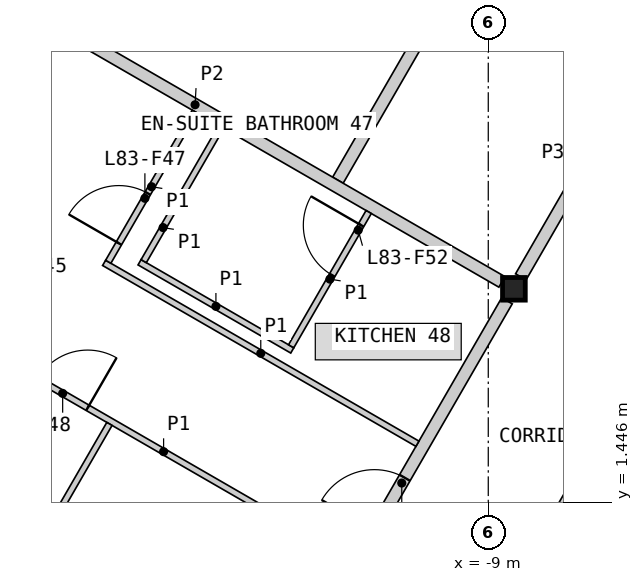
"""IFC4 building model, lengths in metres.
Left out: names, types, materials, properties, quantities, classifications, styles, units other than length and angle.
Written with IfcOpenShell. Run it as: python <this file> out.ifc"""

import sys

from ifc_helpers import new_model, si_unit, direction, frame, frame_2d, origin, origin_2d, place, context, subcontext, project, spatial, rectangle, i_section, extrude, element, fill, save


model = new_model("IFC4")
c1 = context("Model", 3, precision=1e-05, world=origin(), true_north=direction((0.0, 1.0)))
c2 = subcontext(c1, "Body", "Model", "MODEL_VIEW")
j1 = project(units=[si_unit("LENGTHUNIT", "METRE"), si_unit("PLANEANGLEUNIT", "RADIAN")], contexts=[c1])
p1 = place(None, origin())
s1 = spatial("IfcSite", under=j1, at=p1, CompositionType="ELEMENT")
p2 = place(p1, origin())
s2 = spatial("IfcBuilding", under=s1, at=p2, CompositionType="ELEMENT")
p3 = place(p2, frame((0.0, 0.0, 371.2)))
s3 = spatial("IfcBuildingStorey", under=s2, at=p3, CompositionType="ELEMENT", Elevation=371.2)
p4 = place(p3, frame((-8.578, 4.953, 0.0), z_axis=(0.0, 0.0, 1.0), x_axis=(1.0, 0.0, 0.0)))
e1 = element("IfcColumn", 1, at=p4, inside=s3, PredefinedType="COLUMN", context=c2, shape_type="SweptSolid", body=[
    extrude(i_section(OverallWidth=0.374, OverallDepth=0.372, WebThickness=0.016, FlangeThickness=0.026, at=origin_2d()), origin(), (0.0, 0.0, 1.0), 3.4),
])
p5 = place(p3, frame((-7.34, 1.698, 0.0), z_axis=(0.0, 0.0, 1.0), x_axis=(-0.50002983664, -0.866008176907, 0.0)))
e2 = element("IfcWall", 2, at=p5, inside=s3, PredefinedType="SHEAR", context=c2, shape_type="SweptSolid", body=[
    extrude(rectangle(XDim=2.2, YDim=0.6, at=frame_2d((1.1, 0.0))), origin(), (0.0, 0.0, 1.0), 3.1),
])
p6 = place(p5, frame((0.55, 0.0, 0.0)))
e3 = element("IfcOpeningElement", 3, at=p6, cuts=e2, PredefinedType="OPENING", context=c2, shape_type="SweptSolid", body=[
    extrude(rectangle(XDim=1.1, YDim=2.1, at=frame_2d((0.55, 1.05))), frame((0.0, 0.31, 0.0), z_axis=(0.0, -1.0, 0.0), x_axis=(1.0, 0.0, 0.0)), (0.0, 0.0, 1.0), 0.62),
])
p7 = place(p3, frame((-8.465, 5.15, 0.0), z_axis=(0.0, 0.0, 1.0), x_axis=(0.499992155518, 0.866029932751, 0.0)))
e4 = element("IfcWall", 4, at=p7, inside=s3, PredefinedType="PARTITIONING", context=c2, shape_type="SweptSolid", body=[
    extrude(rectangle(XDim=8.123, YDim=0.2, at=frame_2d((4.062, 0.0))), origin(), (0.0, 0.0, 1.0), 3.1),
])
p8 = place(p7, frame((3.587, 0.0, 0.0)))
e5 = element("IfcOpeningElement", 5, at=p8, cuts=e4, PredefinedType="OPENING", context=c2, shape_type="SweptSolid", body=[
    extrude(rectangle(XDim=0.95, YDim=2.1, at=frame_2d((0.475, 1.05))), frame((0.0, 0.11, 0.0), z_axis=(0.0, -1.0, 0.0), x_axis=(1.0, 0.0, 0.0)), (0.0, 0.0, 1.0), 0.22),
])
p9 = place(p3, frame((-12.754, -2.279, 0.0), z_axis=(0.0, 0.0, 1.0), x_axis=(0.500001682468, 0.866024432409, 0.0)))
e6 = element("IfcWall", 6, at=p9, inside=s3, PredefinedType="PARTITIONING", context=c2, shape_type="SweptSolid", body=[
    extrude(rectangle(XDim=8.124, YDim=0.2, at=frame_2d((4.062, 0.0))), origin(), (0.0, 0.0, 1.0), 3.1),
])
p10 = place(p9, frame((3.762, 0.0, 0.0)))
e7 = element("IfcOpeningElement", 7, at=p10, cuts=e6, PredefinedType="OPENING", context=c2, shape_type="SweptSolid", body=[
    extrude(rectangle(XDim=1.0, YDim=2.1, at=frame_2d((0.5, 1.05))), frame((0.0, 0.11, 0.0), z_axis=(0.0, -1.0, 0.0), x_axis=(1.0, 0.0, 0.0)), (0.0, 0.0, 1.0), 0.22),
])
p11 = place(p3, frame((-11.473, 6.74, 0.0), z_axis=(0.0, 0.0, 1.0), x_axis=(0.500001082559, 0.866024778768, 0.0)))
e8 = element("IfcWall", 8, at=p11, inside=s3, PredefinedType="PARTITIONING", context=c2, shape_type="SweptSolid", body=[
    extrude(rectangle(XDim=15.094, YDim=0.2, at=frame_2d((7.547, 0.0))), origin(), (0.0, 0.0, 1.0), 2.33),
])
p12 = place(p11, frame((10.383, 0.0, 0.0)))
e9 = element("IfcOpeningElement", 9, at=p12, cuts=e8, PredefinedType="OPENING", context=c2, shape_type="SweptSolid", body=[
    extrude(rectangle(XDim=0.95, YDim=2.1, at=frame_2d((0.475, 1.05))), frame((0.0, 0.11, 0.0), z_axis=(0.0, -1.0, 0.0), x_axis=(1.0, 0.0, 0.0)), (0.0, 0.0, 1.0), 0.22),
])
p13 = place(p3, frame((-18.869, 10.894, 0.0), z_axis=(0.0, 0.0, 1.0), x_axis=(0.866023724155, -0.500002909193, 0.0)))
e10 = element("IfcWall", 10, at=p13, inside=s3, PredefinedType="PARTITIONING", context=c2, shape_type="SweptSolid", body=[
    extrude(rectangle(XDim=11.655, YDim=0.2, at=frame_2d((5.827, 0.0))), origin(), (0.0, 0.0, 1.0), 2.33),
])
p14 = place(p3, frame((-24.069, 1.887, 0.0), z_axis=(0.0, 0.0, 1.0), x_axis=(0.866023404247, -0.500003463284, 0.0)))
e11 = element("IfcWall", 11, at=p14, inside=s3, PredefinedType="PARTITIONING", context=c2, shape_type="SweptSolid", body=[
    extrude(rectangle(XDim=11.782, YDim=0.1, at=frame_2d((5.891, 0.0))), origin(), (0.0, 0.0, 1.0), 2.33),
])
p15 = place(p14, frame((4.363, 0.0, 0.0)))
e12 = element("IfcOpeningElement", 12, at=p15, cuts=e11, PredefinedType="OPENING", context=c2, shape_type="SweptSolid", body=[
    extrude(rectangle(XDim=0.95, YDim=2.1, at=frame_2d((0.475, 1.05))), frame((0.0, 0.06, 0.0), z_axis=(0.0, -1.0, 0.0), x_axis=(1.0, 0.0, 0.0)), (0.0, 0.0, 1.0), 0.12),
])
p16 = place(p3, frame((-17.414, 4.049, 0.0), z_axis=(0.0, 0.0, 1.0), x_axis=(0.866033839264, -0.499985389037, 0.0)))
e13 = element("IfcWall", 13, at=p16, inside=s3, PredefinedType="PARTITIONING", context=c2, shape_type="SweptSolid", body=[
    extrude(rectangle(XDim=7.1, YDim=0.1, at=frame_2d((3.55, 0.0))), origin(), (0.0, 0.0, 1.0), 2.33),
])
p17 = place(p16, frame((1.158, 0.0, 0.0)))
e14 = element("IfcOpeningElement", 14, at=p17, cuts=e13, PredefinedType="OPENING", context=c2, shape_type="SweptSolid", body=[
    extrude(rectangle(XDim=0.95, YDim=2.1, at=frame_2d((0.475, 1.05))), frame((0.0, 0.06, 0.0), z_axis=(0.0, -1.0, 0.0), x_axis=(1.0, 0.0, 0.0)), (0.0, 0.0, 1.0), 0.12),
])
p18 = place(p3, frame((-15.318, 5.38, 0.0), z_axis=(0.0, 0.0, 1.0), x_axis=(0.866035260786, -0.499982926783, 0.0)))
e15 = element("IfcWall", 15, at=p18, inside=s3, PredefinedType="PARTITIONING", context=c2, shape_type="SweptSolid", body=[
    extrude(rectangle(XDim=5.95, YDim=0.1, at=frame_2d((2.975, 0.0))), origin(), (0.0, 0.0, 1.0), 2.33),
])
p19 = place(p3, frame((-17.78, -1.686, 0.0), z_axis=(0.0, 0.0, 1.0), x_axis=(0.500005610874, 0.86602216432, 0.0)))
e16 = element("IfcWall", 16, at=p19, inside=s3, PredefinedType="PARTITIONING", context=c2, shape_type="SweptSolid", body=[
    extrude(rectangle(XDim=5.1, YDim=0.1, at=frame_2d((2.55, 0.0))), origin(), (0.0, 0.0, 1.0), 2.33),
])
p20 = place(p19, frame((0.656, 0.0, 0.0)))
e17 = element("IfcOpeningElement", 17, at=p20, cuts=e16, PredefinedType="OPENING", context=c2, shape_type="SweptSolid", body=[
    extrude(rectangle(XDim=0.95, YDim=2.1, at=frame_2d((0.475, 1.05))), frame((0.0, 0.06, 0.0), z_axis=(0.0, -1.0, 0.0), x_axis=(1.0, 0.0, 0.0)), (0.0, 0.0, 1.0), 0.12),
])
p21 = place(p3, frame((-15.25, 5.398, 0.0), z_axis=(0.0, 0.0, 1.0), x_axis=(0.499935029643, 0.866062911188, 0.0)))
e18 = element("IfcWall", 18, at=p21, inside=s3, PredefinedType="PARTITIONING", context=c2, shape_type="SweptSolid", body=[
    extrude(rectangle(XDim=2.85, YDim=0.1, at=frame_2d((1.425, 0.0))), origin(), (0.0, 0.0, 1.0), 2.33),
])
p22 = place(p21, frame((0.35, 0.0, 0.0)))
e19 = element("IfcOpeningElement", 19, at=p22, cuts=e18, PredefinedType="OPENING", context=c2, shape_type="SweptSolid", body=[
    extrude(rectangle(XDim=0.95, YDim=2.1, at=frame_2d((0.475, 1.05))), frame((0.0, 0.06, 0.0), z_axis=(0.0, -1.0, 0.0), x_axis=(1.0, 0.0, 0.0)), (0.0, 0.0, 1.0), 0.12),
])
p23 = place(p3, frame((-14.735, 5.389, 0.0), z_axis=(0.0, 0.0, 1.0), x_axis=(0.866032775405, -0.499987231761, 0.0)))
e20 = element("IfcWall", 20, at=p23, inside=s3, PredefinedType="PARTITIONING", context=c2, shape_type="SweptSolid", body=[
    extrude(rectangle(XDim=2.9, YDim=0.1, at=frame_2d((1.45, 0.0))), origin(), (0.0, 0.0, 1.0), 2.33),
])
p24 = place(p3, frame((-12.242, 4.008, 0.0), z_axis=(0.0, 0.0, 1.0), x_axis=(0.499948979701, 0.866054858364, 0.0)))
e21 = element("IfcWall", 21, at=p24, inside=s3, PredefinedType="PARTITIONING", context=c2, shape_type="SweptSolid", body=[
    extrude(rectangle(XDim=2.55, YDim=0.1, at=frame_2d((1.275, 0.0))), origin(), (0.0, 0.0, 1.0), 2.33),
])
p25 = place(p24, frame((1.35, 0.0, 0.0)))
e22 = element("IfcOpeningElement", 22, at=p25, cuts=e21, PredefinedType="OPENING", context=c2, shape_type="SweptSolid", body=[
    extrude(rectangle(XDim=0.95, YDim=2.1, at=frame_2d((0.475, 1.05))), frame((0.0, 0.06, 0.0), z_axis=(0.0, -1.0, 0.0), x_axis=(1.0, 0.0, 0.0)), (0.0, 0.0, 1.0), 0.12),
])
p26 = place(p3, frame((-14.667, 5.408, 0.0), z_axis=(0.0, 0.0, 1.0), x_axis=(0.499948979701, 0.866054858364, 0.0)))
e23 = element("IfcWall", 23, at=p26, inside=s3, PredefinedType="PARTITIONING", context=c2, shape_type="SweptSolid", body=[
    extrude(rectangle(XDim=2.55, YDim=0.1, at=frame_2d((1.275, 0.0))), origin(), (0.0, 0.0, 1.0), 2.33),
])
p27 = place(p10, origin())
e24 = element("IfcDoor", 24, at=p27, inside=s3, OperationType="SINGLE_SWING_LEFT", PredefinedType="DOOR", context=c2, shape_type="SweptSolid", body=[
    extrude(rectangle(XDim=1.0, YDim=2.1, at=frame_2d((0.5, 1.05))), frame((0.0, 0.025, 0.0), z_axis=(0.0, -1.0, 0.0), x_axis=(1.0, 0.0, 0.0)), (0.0, 0.0, 1.0), 0.05),
])
fill(e7, e24)
p28 = place(p22, origin())
e25 = element("IfcDoor", 25, at=p28, inside=s3, OperationType="SINGLE_SWING_LEFT", PredefinedType="DOOR", context=c2, shape_type="SweptSolid", body=[
    extrude(rectangle(XDim=0.95, YDim=2.1, at=frame_2d((0.475, 1.05))), frame((0.0, 0.025, 0.0), z_axis=(0.0, -1.0, 0.0), x_axis=(1.0, 0.0, 0.0)), (0.0, 0.0, 1.0), 0.05),
])
fill(e19, e25)
p29 = place(p17, origin())
e26 = element("IfcDoor", 26, at=p29, inside=s3, OperationType="SINGLE_SWING_RIGHT", PredefinedType="DOOR", context=c2, shape_type="SweptSolid", body=[
    extrude(rectangle(XDim=0.95, YDim=2.1, at=frame_2d((0.475, 1.05))), frame((0.0, 0.025, 0.0), z_axis=(0.0, -1.0, 0.0), x_axis=(1.0, 0.0, 0.0)), (0.0, 0.0, 1.0), 0.05),
])
fill(e14, e26)
p30 = place(p25, origin())
e27 = element("IfcDoor", 27, at=p30, inside=s3, OperationType="SINGLE_SWING_RIGHT", PredefinedType="DOOR", context=c2, shape_type="SweptSolid", body=[
    extrude(rectangle(XDim=0.95, YDim=2.1, at=frame_2d((0.475, 1.05))), frame((0.0, 0.025, 0.0), z_axis=(0.0, -1.0, 0.0), x_axis=(1.0, 0.0, 0.0)), (0.0, 0.0, 1.0), 0.05),
])
fill(e22, e27)
save(model, sys.argv[1])
